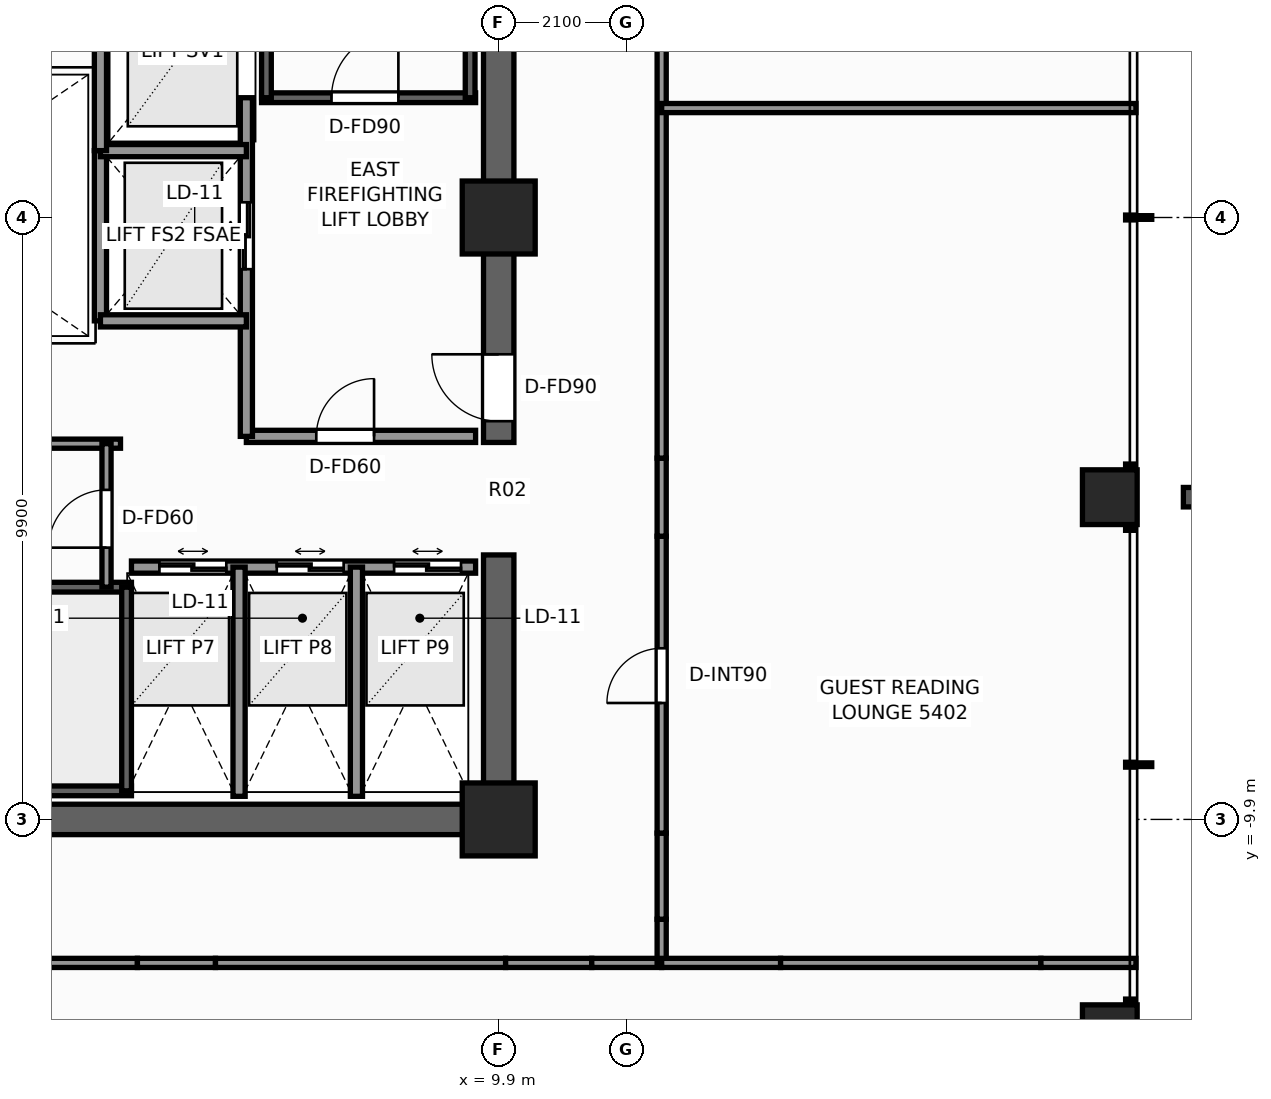
"""IFC4 building model, lengths in metres.
Left out: names, types, materials, properties, quantities, classifications, styles, units other than length and angle.
Written with IfcOpenShell. Run it as: python <this file> out.ifc"""

import sys

from ifc_helpers import new_model, si_unit, direction, frame, frame_2d, origin, origin_2d, place, context, subcontext, project, spatial, rectangle, extrude, element, fill, save


model = new_model("IFC4")
c1 = context("Model", 3, precision=1e-05, world=origin(), true_north=direction((0.0, 1.0)))
c2 = subcontext(c1, "Body", "Model", "MODEL_VIEW")
j1 = project(units=[si_unit("LENGTHUNIT", "METRE"), si_unit("PLANEANGLEUNIT", "RADIAN")], contexts=[c1])
p1 = place(None, origin())
s1 = spatial("IfcSite", under=j1, at=p1, CompositionType="ELEMENT")
p2 = place(p1, origin())
s2 = spatial("IfcBuilding", under=s1, at=p2, CompositionType="ELEMENT")
p3 = place(p2, frame((0.0, 0.0, 186.6)))
s3 = spatial("IfcBuildingStorey", under=s2, at=p3, CompositionType="ELEMENT", Elevation=186.6)
p4 = place(p3, frame((10.15, -9.9, 0.0), z_axis=(0.0, 0.0, 1.0), x_axis=(-1.0, 0.0, 0.0)))
e1 = element("IfcWall", 1, at=p4, inside=s3, PredefinedType="SHEAR", context=c2, shape_type="SweptSolid", body=[
    extrude(rectangle(XDim=12.01, YDim=0.5, at=frame_2d((6.005, 0.0))), origin(), (0.0, 0.0, 1.0), 3.3),
])
p5 = place(p3, frame((9.9, -9.65, 0.0), z_axis=(0.0, 0.0, 1.0), x_axis=(0.0, 1.0, 0.0)))
e2 = element("IfcWall", 2, at=p5, inside=s3, PredefinedType="SHEAR", context=c2, shape_type="SweptSolid", body=[
    extrude(rectangle(XDim=4.1, YDim=0.5, at=frame_2d((2.05, 0.0))), origin(), (0.0, 0.0, 1.0), 3.3),
])
p6 = place(p3, frame((9.9, -3.7, 0.0), z_axis=(0.0, 0.0, 1.0), x_axis=(0.0, 1.0, 0.0)))
e3 = element("IfcWall", 3, at=p6, inside=s3, PredefinedType="SHEAR", context=c2, shape_type="SweptSolid", body=[
    extrude(rectangle(XDim=13.35, YDim=0.5, at=frame_2d((6.675, 0.0))), origin(), (0.0, 0.0, 1.0), 3.3),
])
p7 = place(p6, frame((0.35, 0.0, 0.0)))
e4 = element("IfcOpeningElement", 4, at=p7, cuts=e3, PredefinedType="OPENING", context=c2, shape_type="SweptSolid", body=[
    extrude(rectangle(XDim=1.1, YDim=2.2, at=frame_2d((0.55, 1.1))), frame((0.0, 0.26, 0.0), z_axis=(0.0, -1.0, 0.0), x_axis=(1.0, 0.0, 0.0)), (0.0, 0.0, 1.0), 0.52),
])
for number, where, z_axis, x_axis in (
    (5, (9.9, -9.9, 0.0), (0.0, 0.0, 1.0), (1.0, 0.0, 0.0)),
    (6, (9.9, 0.0, 0.0), (0.0, 0.0, 1.0), (1.0, 0.0, 0.0)),
):
    element("IfcColumn", number, at=place(p3, frame(where, z_axis=z_axis, x_axis=x_axis)), inside=s3, PredefinedType="COLUMN", context=c2, shape_type="SweptSolid", body=[
        extrude(rectangle(XDim=1.2, YDim=1.2, at=origin_2d()), origin(), (0.0, 0.0, 1.0), 3.3),
    ])
for number, where, z_axis, x_axis in (
    (7, (19.95, -13.4, 0.0), (0.0, 0.0, 1.0), (1.0, 0.0, 0.0)),
    (8, (19.95, -4.6, 0.0), (0.0, 0.0, 1.0), (1.0, 0.0, 0.0)),
):
    element("IfcColumn", number, at=place(p3, frame(where, z_axis=z_axis, x_axis=x_axis)), inside=s3, PredefinedType="COLUMN", context=c2, shape_type="SweptSolid", body=[
        extrude(rectangle(XDim=0.9, YDim=0.9, at=origin_2d()), origin(), (0.0, 0.0, 1.0), 3.3),
    ])
p8 = place(p3, frame((6.0, 1.97, 0.0), z_axis=(0.0, 0.0, 1.0), x_axis=(1.0, 0.0, 0.0)))
e9 = element("IfcWall", 9, at=p8, inside=s3, PredefinedType="SHEAR", context=c2, shape_type="SweptSolid", body=[
    extrude(rectangle(XDim=3.52, YDim=0.16, at=frame_2d((1.76, 0.0))), origin(), (0.0, 0.0, 1.0), 3.3),
])
p9 = place(p8, frame((1.15, 0.0, 0.0)))
e10 = element("IfcOpeningElement", 10, at=p9, cuts=e9, PredefinedType="OPENING", context=c2, shape_type="SweptSolid", body=[
    extrude(rectangle(XDim=1.1, YDim=2.2, at=frame_2d((0.55, 1.1))), frame((0.0, 0.09, 0.0), z_axis=(0.0, -1.0, 0.0), x_axis=(1.0, 0.0, 0.0)), (0.0, 0.0, 1.0), 0.18),
])
for number, where, z_axis, x_axis in (
    (11, (6.08, 1.97, 0.0), (0.0, 0.0, 1.0), (0.0, 1.0, 0.0)),
    (12, (9.43, 1.97, 0.0), (0.0, 0.0, 1.0), (0.0, 1.0, 0.0)),
):
    element("IfcWall", number, at=place(p3, frame(where, z_axis=z_axis, x_axis=x_axis)), inside=s3, PredefinedType="SHEAR", context=c2, shape_type="SweptSolid", body=[
        extrude(rectangle(XDim=7.56, YDim=0.16, at=frame_2d((3.78, 0.0))), origin(), (0.0, 0.0, 1.0), 3.3),
    ])
p10 = place(p3, frame((3.86, -9.43, 0.0), z_axis=(0.0, 0.0, 1.0), x_axis=(-1.0, 0.0, 0.0)))
e13 = element("IfcWall", 13, at=p10, inside=s3, PredefinedType="SHEAR", context=c2, shape_type="SweptSolid", body=[
    extrude(rectangle(XDim=7.72, YDim=0.16, at=frame_2d((3.86, 0.0))), origin(), (0.0, 0.0, 1.0), 3.3),
])
p11 = place(p10, frame((6.01, 0.0, 0.0)))
e14 = element("IfcOpeningElement", 14, at=p11, cuts=e13, PredefinedType="OPENING", context=c2, shape_type="SweptSolid", body=[
    extrude(rectangle(XDim=1.1, YDim=2.2, at=frame_2d((0.55, 1.1))), frame((0.0, 0.09, 0.0), z_axis=(0.0, -1.0, 0.0), x_axis=(1.0, 0.0, 0.0)), (0.0, 0.0, 1.0), 0.18),
])
p12 = place(p3, frame((-3.86, -6.08, 0.0), z_axis=(0.0, 0.0, 1.0), x_axis=(1.0, 0.0, 0.0)))
e15 = element("IfcWall", 15, at=p12, inside=s3, PredefinedType="SHEAR", context=c2, shape_type="SweptSolid", body=[
    extrude(rectangle(XDim=7.72, YDim=0.16, at=frame_2d((3.86, 0.0))), origin(), (0.0, 0.0, 1.0), 3.3),
])
p13 = place(p3, frame((3.78, -9.43, 0.0), z_axis=(0.0, 0.0, 1.0), x_axis=(0.0, 1.0, 0.0)))
e16 = element("IfcWall", 16, at=p13, inside=s3, PredefinedType="SHEAR", context=c2, shape_type="SweptSolid", body=[
    extrude(rectangle(XDim=3.35, YDim=0.16, at=frame_2d((1.675, 0.0))), origin(), (0.0, 0.0, 1.0), 3.3),
])
p14 = place(p3, frame((5.75, -3.6, 0.0), z_axis=(0.0, 0.0, 1.0), x_axis=(1.0, 0.0, 0.0)))
e17 = element("IfcWall", 17, at=p14, inside=s3, PredefinedType="SOLIDWALL", context=c2, shape_type="SweptSolid", body=[
    extrude(rectangle(XDim=3.77, YDim=0.2, at=frame_2d((1.885, 0.0))), origin(), (0.0, 0.0, 1.0), 3.08),
])
p15 = place(p14, frame((1.15, 0.0, 0.0)))
e18 = element("IfcOpeningElement", 18, at=p15, cuts=e17, PredefinedType="OPENING", context=c2, shape_type="SweptSolid", body=[
    extrude(rectangle(XDim=0.95, YDim=2.06, at=frame_2d((0.475, 1.03))), frame((0.0, 0.11, 0.0), z_axis=(0.0, -1.0, 0.0), x_axis=(1.0, 0.0, 0.0)), (0.0, 0.0, 1.0), 0.22),
])
p16 = place(p3, frame((5.75, -3.6, 0.0), z_axis=(0.0, 0.0, 1.0), x_axis=(0.0, 1.0, 0.0)))
e19 = element("IfcWall", 19, at=p16, inside=s3, PredefinedType="SOLIDWALL", context=c2, shape_type="SweptSolid", body=[
    extrude(rectangle(XDim=5.57, YDim=0.2, at=frame_2d((2.785, 0.0))), origin(), (0.0, 0.0, 1.0), 2.715),
])
p17 = place(p16, frame((2.75, 0.0, 0.0)))
e20 = element("IfcOpeningElement", 20, at=p17, cuts=e19, PredefinedType="OPENING", context=c2, shape_type="SweptSolid", body=[
    extrude(rectangle(XDim=1.1, YDim=2.2, at=frame_2d((0.55, 1.1))), frame((0.0, 0.11, 0.0), z_axis=(0.0, -1.0, 0.0), x_axis=(1.0, 0.0, 0.0)), (0.0, 0.0, 1.0), 0.22),
])
p18 = place(p3, frame((3.35, -1.7, 0.0), z_axis=(0.0, 0.0, 1.0), x_axis=(0.0, 1.0, 0.0)))
e21 = element("IfcWall", 21, at=p18, inside=s3, PredefinedType="SOLIDWALL", context=c2, shape_type="SweptSolid", body=[
    extrude(rectangle(XDim=2.8, YDim=0.2, at=frame_2d((1.4, 0.0))), origin(), (0.0, 0.0, 1.0), 2.715),
])
for number, where, z_axis, x_axis in (
    (22, (3.35, -1.7, 0.0), (0.0, 0.0, 1.0), (1.0, 0.0, 0.0)),
    (23, (3.35, 1.1, 0.0), (0.0, 0.0, 1.0), (1.0, 0.0, 0.0)),
):
    element("IfcWall", number, at=place(p3, frame(where, z_axis=z_axis, x_axis=x_axis)), inside=s3, PredefinedType="SOLIDWALL", context=c2, shape_type="SweptSolid", body=[
        extrude(rectangle(XDim=2.4, YDim=0.2, at=frame_2d((1.2, 0.0))), origin(), (0.0, 0.0, 1.0), 3.08),
    ])
p19 = place(p3, frame((3.35, 1.1, 0.0), z_axis=(0.0, 0.0, 1.0), x_axis=(0.0, 1.0, 0.0)))
e24 = element("IfcWall", 24, at=p19, inside=s3, PredefinedType="SOLIDWALL", context=c2, shape_type="SweptSolid", body=[
    extrude(rectangle(XDim=3.2, YDim=0.2, at=frame_2d((1.6, 0.0))), origin(), (0.0, 0.0, 1.0), 2.715),
])
p20 = place(p3, frame((3.86, -5.75, 0.0), z_axis=(0.0, 0.0, 1.0), x_axis=(1.0, 0.0, 0.0)))
e25 = element("IfcWall", 25, at=p20, inside=s3, PredefinedType="SOLIDWALL", context=c2, shape_type="SweptSolid", body=[
    extrude(rectangle(XDim=5.66, YDim=0.2, at=frame_2d((2.83, 0.0))), origin(), (0.0, 0.0, 1.0), 3.08),
])
p21 = place(p20, frame((0.46, 0.0, 0.0)))
e26 = element("IfcOpeningElement", 26, at=p21, cuts=e25, PredefinedType="OPENING", context=c2, shape_type="SweptSolid", body=[
    extrude(rectangle(XDim=1.1, YDim=2.2, at=frame_2d((0.55, 1.1))), frame((0.0, 0.11, 0.0), z_axis=(0.0, -1.0, 0.0), x_axis=(1.0, 0.0, 0.0)), (0.0, 0.0, 1.0), 0.22),
])
p22 = place(p20, frame((2.39, 0.0, 0.0)))
e27 = element("IfcOpeningElement", 27, at=p22, cuts=e25, PredefinedType="OPENING", context=c2, shape_type="SweptSolid", body=[
    extrude(rectangle(XDim=1.1, YDim=2.2, at=frame_2d((0.55, 1.1))), frame((0.0, 0.11, 0.0), z_axis=(0.0, -1.0, 0.0), x_axis=(1.0, 0.0, 0.0)), (0.0, 0.0, 1.0), 0.22),
])
p23 = place(p20, frame((4.32, 0.0, 0.0)))
e28 = element("IfcOpeningElement", 28, at=p23, cuts=e25, PredefinedType="OPENING", context=c2, shape_type="SweptSolid", body=[
    extrude(rectangle(XDim=1.1, YDim=2.2, at=frame_2d((0.55, 1.1))), frame((0.0, 0.11, 0.0), z_axis=(0.0, -1.0, 0.0), x_axis=(1.0, 0.0, 0.0)), (0.0, 0.0, 1.0), 0.22),
])
for number, where, z_axis, x_axis in (
    (29, (5.63, -9.52, 0.0), (0.0, 0.0, 1.0), (0.0, 1.0, 0.0)),
    (30, (7.56, -9.52, 0.0), (0.0, 0.0, 1.0), (0.0, 1.0, 0.0)),
):
    element("IfcWall", number, at=place(p3, frame(where, z_axis=z_axis, x_axis=x_axis)), inside=s3, PredefinedType="SOLIDWALL", context=c2, shape_type="SweptSolid", body=[
        extrude(rectangle(XDim=3.77, YDim=0.2, at=frame_2d((1.885, 0.0))), origin(), (0.0, 0.0, 1.0), 3.08),
    ])
p24 = place(p3, frame((-3.68, -3.72, 0.0), z_axis=(0.0, 0.0, 1.0), x_axis=(1.0, 0.0, 0.0)))
e31 = element("IfcWall", 31, at=p24, inside=s3, PredefinedType="PARTITIONING", context=c2, shape_type="SweptSolid", body=[
    extrude(rectangle(XDim=7.36, YDim=0.15, at=frame_2d((3.68, 0.0))), origin(), (0.0, 0.0, 1.0), 3.08),
])
p25 = place(p3, frame((3.45, -6.08, 0.0), z_axis=(0.0, 0.0, 1.0), x_axis=(0.0, 1.0, 0.0)))
e32 = element("IfcWall", 32, at=p25, inside=s3, PredefinedType="PARTITIONING", context=c2, shape_type="SweptSolid", body=[
    extrude(rectangle(XDim=2.36, YDim=0.15, at=frame_2d((1.18, 0.0))), origin(), (0.0, 0.0, 1.0), 3.08),
])
p26 = place(p25, frame((0.65, 0.0, 0.0)))
e33 = element("IfcOpeningElement", 33, at=p26, cuts=e32, PredefinedType="OPENING", context=c2, shape_type="SweptSolid", body=[
    extrude(rectangle(XDim=0.95, YDim=2.06, at=frame_2d((0.475, 1.03))), frame((0.0, 0.085, 0.0), z_axis=(0.0, -1.0, 0.0), x_axis=(1.0, 0.0, 0.0)), (0.0, 0.0, 1.0), 0.17),
])
p27 = place(p3, frame((-3.958, -12.26, 0.0), z_axis=(0.0, 0.0, 1.0), x_axis=(1.0, 0.0, 0.0)))
e34 = element("IfcWall", 34, at=p27, inside=s3, PredefinedType="PARTITIONING", context=c2, shape_type="SweptSolid", body=[
    extrude(rectangle(XDim=7.916, YDim=0.15, at=frame_2d((3.958, 0.0))), origin(), (0.0, 0.0, 1.0), 2.605),
])
p28 = place(p3, frame((3.958, -12.26, 0.0), z_axis=(0.0, 0.0, 1.0), x_axis=(1.0, 0.0, 0.0)))
e35 = element("IfcWall", 35, at=p28, inside=s3, PredefinedType="PARTITIONING", context=c2, shape_type="SweptSolid", body=[
    extrude(rectangle(XDim=1.284, YDim=0.15, at=frame_2d((0.642, 0.0))), origin(), (0.0, 0.0, 1.0), 1.265),
])
p29 = place(p3, frame((5.242, -12.26, 0.0), z_axis=(0.0, 0.0, 1.0), x_axis=(1.0, 0.0, 0.0)))
e36 = element("IfcWall", 36, at=p29, inside=s3, PredefinedType="PARTITIONING", context=c2, shape_type="SweptSolid", body=[
    extrude(rectangle(XDim=4.772, YDim=0.15, at=frame_2d((2.386, 0.0))), origin(), (0.0, 0.0, 1.0), 3.08),
])
p30 = place(p3, frame((10.014, -12.26, 0.0), z_axis=(0.0, 0.0, 1.0), x_axis=(1.0, 0.0, 0.0)))
e37 = element("IfcWall", 37, at=p30, inside=s3, PredefinedType="PARTITIONING", context=c2, shape_type="SweptSolid", body=[
    extrude(rectangle(XDim=1.417, YDim=0.15, at=frame_2d((0.708, 0.0))), origin(), (0.0, 0.0, 1.0), 1.265),
])
p31 = place(p3, frame((11.43, -12.26, 0.0), z_axis=(0.0, 0.0, 1.0), x_axis=(1.0, 0.0, 0.0)))
e38 = element("IfcWall", 38, at=p31, inside=s3, PredefinedType="PARTITIONING", context=c2, shape_type="SweptSolid", body=[
    extrude(rectangle(XDim=1.15, YDim=0.15, at=frame_2d((0.575, 0.0))), origin(), (0.0, 0.0, 1.0), 3.08),
])
p32 = place(p3, frame((12.58, -12.26, 0.0), z_axis=(0.0, 0.0, 1.0), x_axis=(0.0, 1.0, 0.0)))
e39 = element("IfcWall", 39, at=p32, inside=s3, PredefinedType="PARTITIONING", context=c2, shape_type="SweptSolid", body=[
    extrude(rectangle(XDim=0.718, YDim=0.15, at=frame_2d((0.359, 0.0))), origin(), (0.0, 0.0, 1.0), 3.08),
])
p33 = place(p3, frame((12.58, -11.542, 0.0), z_axis=(0.0, 0.0, 1.0), x_axis=(0.0, 1.0, 0.0)))
e40 = element("IfcWall", 40, at=p33, inside=s3, PredefinedType="PARTITIONING", context=c2, shape_type="SweptSolid", body=[
    extrude(rectangle(XDim=1.417, YDim=0.15, at=frame_2d((0.708, 0.0))), origin(), (0.0, 0.0, 1.0), 1.265),
])
p34 = place(p3, frame((12.58, -10.125, 0.0), z_axis=(0.0, 0.0, 1.0), x_axis=(0.0, 1.0, 0.0)))
e41 = element("IfcWall", 41, at=p34, inside=s3, PredefinedType="PARTITIONING", context=c2, shape_type="SweptSolid", body=[
    extrude(rectangle(XDim=4.883, YDim=0.15, at=frame_2d((2.441, 0.0))), origin(), (0.0, 0.0, 1.0), 3.08),
])
p35 = place(p34, frame((2.14, 0.0, 0.0)))
e42 = element("IfcOpeningElement", 42, at=p35, cuts=e41, PredefinedType="OPENING", context=c2, shape_type="SweptSolid", body=[
    extrude(rectangle(XDim=0.9, YDim=2.06, at=frame_2d((0.45, 1.03))), frame((0.0, 0.085, 0.0), z_axis=(0.0, -1.0, 0.0), x_axis=(1.0, 0.0, 0.0)), (0.0, 0.0, 1.0), 0.17),
])
p36 = place(p3, frame((12.58, -5.242, 0.0), z_axis=(0.0, 0.0, 1.0), x_axis=(0.0, 1.0, 0.0)))
e43 = element("IfcWall", 43, at=p36, inside=s3, PredefinedType="PARTITIONING", context=c2, shape_type="SweptSolid", body=[
    extrude(rectangle(XDim=1.284, YDim=0.15, at=frame_2d((0.642, 0.0))), origin(), (0.0, 0.0, 1.0), 1.265),
])
p37 = place(p3, frame((12.58, -3.958, 0.0), z_axis=(0.0, 0.0, 1.0), x_axis=(0.0, 1.0, 0.0)))
e44 = element("IfcWall", 44, at=p37, inside=s3, PredefinedType="PARTITIONING", context=c2, shape_type="SweptSolid", body=[
    extrude(rectangle(XDim=7.916, YDim=0.15, at=frame_2d((3.958, 0.0))), origin(), (0.0, 0.0, 1.0), 2.369),
])
p38 = place(p3, frame((12.58, -12.26, 0.0), z_axis=(0.0, 0.0, 1.0), x_axis=(1.0, 0.0, 0.0)))
e45 = element("IfcWall", 45, at=p38, inside=s3, PredefinedType="PARTITIONING", context=c2, shape_type="SweptSolid", body=[
    extrude(rectangle(XDim=1.956, YDim=0.15, at=frame_2d((0.978, 0.0))), origin(), (0.0, 0.0, 1.0), 3.08),
])
p39 = place(p3, frame((14.536, -12.26, 0.0), z_axis=(0.0, 0.0, 1.0), x_axis=(1.0, 0.0, 0.0)))
e46 = element("IfcWall", 46, at=p39, inside=s3, PredefinedType="PARTITIONING", context=c2, shape_type="SweptSolid", body=[
    extrude(rectangle(XDim=4.281, YDim=0.15, at=frame_2d((2.141, 0.0))), origin(), (0.0, 0.0, 1.0), 1.265),
])
p40 = place(p3, frame((18.817, -12.26, 0.0), z_axis=(0.0, 0.0, 1.0), x_axis=(1.0, 0.0, 0.0)))
e47 = element("IfcWall", 47, at=p40, inside=s3, PredefinedType="PARTITIONING", context=c2, shape_type="SweptSolid", body=[
    extrude(rectangle(XDim=1.563, YDim=0.15, at=frame_2d((0.781, 0.0))), origin(), (0.0, 0.0, 1.0), 2.453),
])
p41 = place(p3, frame((12.58, 1.8, 0.0), z_axis=(0.0, 0.0, 1.0), x_axis=(1.0, 0.0, 0.0)))
e48 = element("IfcWall", 48, at=p41, inside=s3, PredefinedType="PARTITIONING", context=c2, shape_type="SweptSolid", body=[
    extrude(rectangle(XDim=7.8, YDim=0.15, at=frame_2d((3.9, 0.0))), origin(), (0.0, 0.0, 1.0), 2.453),
])
p42 = place(p9, origin())
e49 = element("IfcDoor", 49, at=p42, inside=s3, OperationType="SINGLE_SWING_RIGHT", PredefinedType="DOOR", context=c2, shape_type="SweptSolid", body=[
    extrude(rectangle(XDim=1.1, YDim=2.2, at=frame_2d((0.55, 1.1))), frame((0.0, 0.025, 0.0), z_axis=(0.0, -1.0, 0.0), x_axis=(1.0, 0.0, 0.0)), (0.0, 0.0, 1.0), 0.05),
])
fill(e10, e49)
p43 = place(p7, origin())
e50 = element("IfcDoor", 50, at=p43, inside=s3, OperationType="SINGLE_SWING_RIGHT", PredefinedType="DOOR", context=c2, shape_type="SweptSolid", body=[
    extrude(rectangle(XDim=1.1, YDim=2.2, at=frame_2d((0.55, 1.1))), frame((0.0, 0.025, 0.0), z_axis=(0.0, -1.0, 0.0), x_axis=(1.0, 0.0, 0.0)), (0.0, 0.0, 1.0), 0.05),
])
fill(e4, e50)
p44 = place(p17, origin())
e51 = element("IfcDoor", 51, at=p44, inside=s3, OperationType="DOUBLE_DOOR_SLIDING", PredefinedType="DOOR", context=c2, shape_type="SweptSolid", body=[
    extrude(rectangle(XDim=1.1, YDim=2.2, at=frame_2d((0.55, 1.1))), frame((0.0, 0.025, 0.0), z_axis=(0.0, -1.0, 0.0), x_axis=(1.0, 0.0, 0.0)), (0.0, 0.0, 1.0), 0.05),
])
fill(e20, e51)
p45 = place(p21, origin())
e52 = element("IfcDoor", 52, at=p45, inside=s3, OperationType="DOUBLE_DOOR_SLIDING", PredefinedType="DOOR", context=c2, shape_type="SweptSolid", body=[
    extrude(rectangle(XDim=1.1, YDim=2.2, at=frame_2d((0.55, 1.1))), frame((0.0, 0.025, 0.0), z_axis=(0.0, -1.0, 0.0), x_axis=(1.0, 0.0, 0.0)), (0.0, 0.0, 1.0), 0.05),
])
fill(e26, e52)
p46 = place(p22, origin())
e53 = element("IfcDoor", 53, at=p46, inside=s3, OperationType="DOUBLE_DOOR_SLIDING", PredefinedType="DOOR", context=c2, shape_type="SweptSolid", body=[
    extrude(rectangle(XDim=1.1, YDim=2.2, at=frame_2d((0.55, 1.1))), frame((0.0, 0.025, 0.0), z_axis=(0.0, -1.0, 0.0), x_axis=(1.0, 0.0, 0.0)), (0.0, 0.0, 1.0), 0.05),
])
fill(e27, e53)
p47 = place(p23, origin())
e54 = element("IfcDoor", 54, at=p47, inside=s3, OperationType="DOUBLE_DOOR_SLIDING", PredefinedType="DOOR", context=c2, shape_type="SweptSolid", body=[
    extrude(rectangle(XDim=1.1, YDim=2.2, at=frame_2d((0.55, 1.1))), frame((0.0, 0.025, 0.0), z_axis=(0.0, -1.0, 0.0), x_axis=(1.0, 0.0, 0.0)), (0.0, 0.0, 1.0), 0.05),
])
fill(e28, e54)
p48 = place(p15, origin())
e55 = element("IfcDoor", 55, at=p48, inside=s3, OperationType="SINGLE_SWING_RIGHT", PredefinedType="DOOR", context=c2, shape_type="SweptSolid", body=[
    extrude(rectangle(XDim=0.95, YDim=2.06, at=frame_2d((0.475, 1.03))), frame((0.0, 0.025, 0.0), z_axis=(0.0, -1.0, 0.0), x_axis=(1.0, 0.0, 0.0)), (0.0, 0.0, 1.0), 0.05),
])
fill(e18, e55)
p49 = place(p26, origin())
e56 = element("IfcDoor", 56, at=p49, inside=s3, OperationType="SINGLE_SWING_LEFT", PredefinedType="DOOR", context=c2, shape_type="SweptSolid", body=[
    extrude(rectangle(XDim=0.95, YDim=2.06, at=frame_2d((0.475, 1.03))), frame((0.0, 0.025, 0.0), z_axis=(0.0, -1.0, 0.0), x_axis=(1.0, 0.0, 0.0)), (0.0, 0.0, 1.0), 0.05),
])
fill(e33, e56)
p50 = place(p35, origin())
e57 = element("IfcDoor", 57, at=p50, inside=s3, OperationType="SINGLE_SWING_LEFT", PredefinedType="DOOR", context=c2, shape_type="SweptSolid", body=[
    extrude(rectangle(XDim=0.9, YDim=2.06, at=frame_2d((0.45, 1.03))), frame((0.0, 0.025, 0.0), z_axis=(0.0, -1.0, 0.0), x_axis=(1.0, 0.0, 0.0)), (0.0, 0.0, 1.0), 0.05),
])
fill(e42, e57)
save(model, sys.argv[1])
